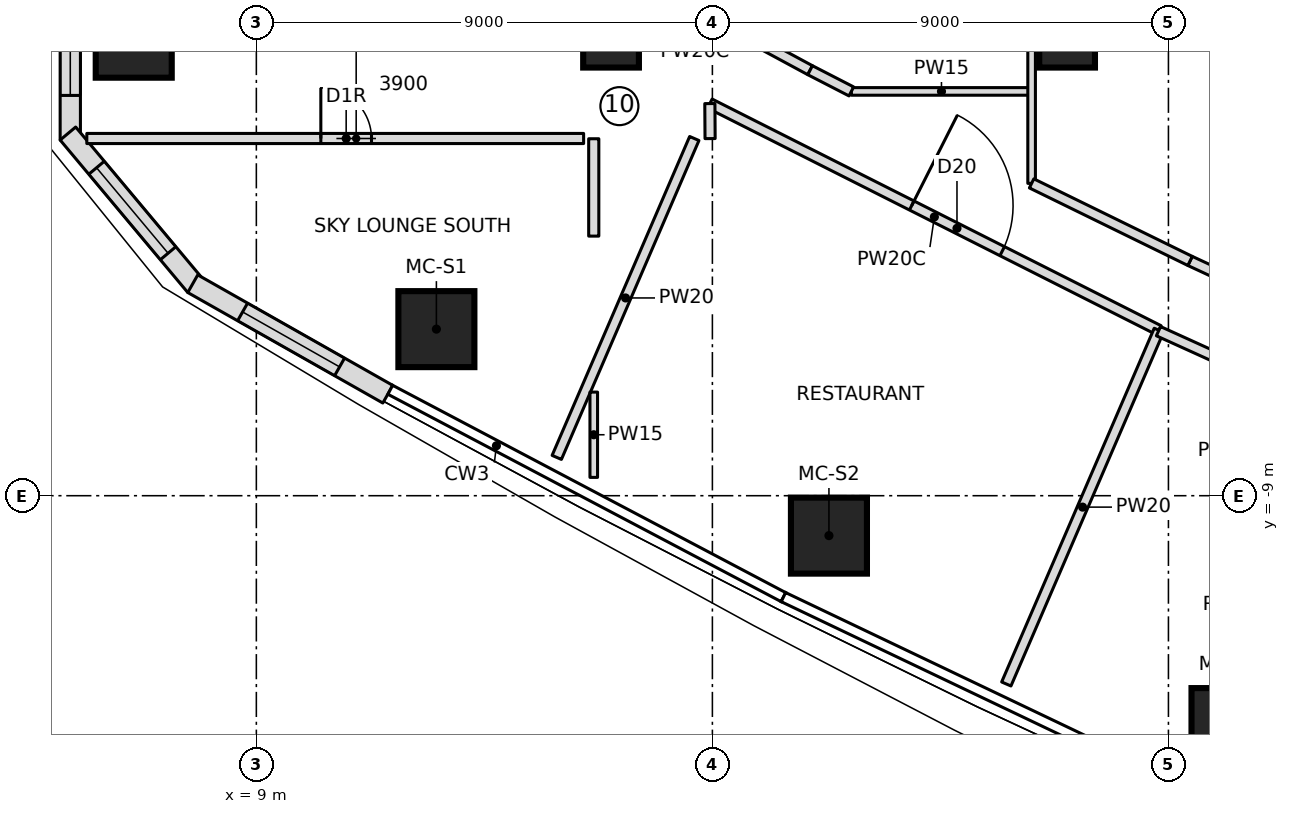
"""IFC4 building model, lengths in metres.
Left out: names, types, materials, properties, quantities, classifications, styles, units other than length and angle.
Written with IfcOpenShell. Run it as: python <this file> out.ifc"""

import sys

from ifc_helpers import new_model, si_unit, direction, frame, frame_2d, origin, origin_2d, place, context, subcontext, project, spatial, polyline, rectangle, outline, extrude, element, fill, save


model = new_model("IFC4")
c1 = context("Model", 3, precision=1e-05, world=origin(), true_north=direction((0.0, 1.0)))
c2 = subcontext(c1, "Body", "Model", "MODEL_VIEW")
j1 = project(units=[si_unit("LENGTHUNIT", "METRE"), si_unit("PLANEANGLEUNIT", "RADIAN")], contexts=[c1])
p1 = place(None, origin())
s1 = spatial("IfcSite", under=j1, at=p1, CompositionType="ELEMENT")
p2 = place(p1, origin())
s2 = spatial("IfcBuilding", under=s1, at=p2, CompositionType="ELEMENT")
p3 = place(p2, frame((0.0, 0.0, 125.6)))
s3 = spatial("IfcBuildingStorey", under=s2, at=p3, CompositionType="ELEMENT", Elevation=125.6)
for number, where, z_axis, x_axis in (
    (1, (6.58, 0.0, 0.0), (0.0, 0.0, 1.0), (1.0, 0.0, 0.0)),
    (2, (12.553, -5.713, 0.0), (0.0, 0.0, 1.0), (1.0, 0.0, 0.0)),
    (3, (20.3, -9.788, 0.0), (0.0, 0.0, 1.0), (1.0, 0.0, 0.0)),
    (4, (28.205, -13.547, 0.0), (0.0, 0.0, 1.0), (1.0, 0.0, 0.0)),
):
    element("IfcColumn", number, at=place(p3, frame(where, z_axis=z_axis, x_axis=x_axis)), inside=s3, PredefinedType="COLUMN", context=c2, shape_type="SweptSolid", body=[
        extrude(rectangle(XDim=1.5, YDim=1.5, at=origin_2d()), origin(), (0.0, 0.0, 1.0), 4.6),
    ])
for number, where, z_axis, x_axis in (
    (5, (16.0, 0.0, 0.0), (0.0, 0.0, 1.0), (1.0, 0.0, 0.0)),
    (6, (25.0, 0.0, 0.0), (0.0, 0.0, 1.0), (1.0, 0.0, 0.0)),
):
    element("IfcColumn", number, at=place(p3, frame(where, z_axis=z_axis, x_axis=x_axis)), inside=s3, PredefinedType="COLUMN", context=c2, shape_type="SweptSolid", body=[
        extrude(rectangle(XDim=1.1, YDim=1.1, at=origin_2d()), origin(), (0.0, 0.0, 1.0), 4.6),
    ])
p4 = place(p3, frame((5.328, 1.908, 0.0), z_axis=(0.0, 0.0, 1.0), x_axis=(0.0, -1.0, 0.0)))
e7 = element("IfcWall", 7, at=p4, inside=s3, PredefinedType="NOTDEFINED", context=c2, shape_type="SweptSolid", body=[
    extrude(outline(polyline([(-0.073, -0.2), (3.888, -0.2), (3.743, 0.2), (0.073, 0.2), (-0.073, -0.2)])), origin(), (0.0, 0.0, 1.0), 4.3),
])
p5 = place(p4, frame((0.808, 0.0, 0.6)))
e8 = element("IfcOpeningElement", 8, at=p5, cuts=e7, PredefinedType="OPENING", context=c2, shape_type="SweptSolid", body=[
    extrude(outline(polyline([(0.0, 1.35), (0.084, 1.771), (0.322, 2.128), (0.679, 2.366), (1.1, 2.45), (1.521, 2.366), (1.878, 2.128), (2.116, 1.771), (2.2, 1.35), (2.2, 1.1), (2.116, 0.679), (1.878, 0.322), (1.521, 0.084), (1.1, 0.0), (0.679, 0.084), (0.322, 0.322), (0.084, 0.679), (0.0, 1.1), (0.0, 1.35)])), frame((0.0, 0.21, 0.0), z_axis=(0.0, -1.0, 0.0), x_axis=(1.0, 0.0, 0.0)), (0.0, 0.0, 1.0), 0.42),
])
p6 = place(p3, frame((5.328, -1.908, 0.0), z_axis=(0.0, 0.0, 1.0), x_axis=(0.641787918235, -0.766882173484, 0.0)))
e9 = element("IfcWall", 9, at=p6, inside=s3, PredefinedType="NOTDEFINED", context=c2, shape_type="SweptSolid", body=[
    extrude(outline(polyline([(-0.073, -0.2), (3.852, -0.2), (3.779, 0.2), (0.073, 0.2), (-0.073, -0.2)])), origin(), (0.0, 0.0, 1.0), 4.3),
])
p7 = place(p6, frame((0.808, 0.0, 0.6)))
e10 = element("IfcOpeningElement", 10, at=p7, cuts=e9, PredefinedType="OPENING", context=c2, shape_type="SweptSolid", body=[
    extrude(outline(polyline([(0.0, 1.35), (0.084, 1.771), (0.322, 2.128), (0.679, 2.366), (1.1, 2.45), (1.521, 2.366), (1.878, 2.128), (2.116, 1.771), (2.2, 1.35), (2.2, 1.1), (2.116, 0.679), (1.878, 0.322), (1.521, 0.084), (1.1, 0.0), (0.679, 0.084), (0.322, 0.322), (0.084, 0.679), (0.0, 1.1), (0.0, 1.35)])), frame((0.0, 0.21, 0.0), z_axis=(0.0, -1.0, 0.0), x_axis=(1.0, 0.0, 0.0)), (0.0, 0.0, 1.0), 0.42),
])
p8 = place(p3, frame((7.777, -4.834, 0.0), z_axis=(0.0, 0.0, 1.0), x_axis=(0.870045255208, -0.492971859125, 0.0)))
e11 = element("IfcWall", 11, at=p8, inside=s3, PredefinedType="NOTDEFINED", context=c2, shape_type="SweptSolid", body=[
    extrude(outline(polyline([(-0.036, -0.2), (4.388, -0.2), (4.388, 0.2), (0.036, 0.2), (-0.036, -0.2)])), origin(), (0.0, 0.0, 1.0), 4.3),
])
p9 = place(p8, frame((1.094, 0.0, 0.6)))
e12 = element("IfcOpeningElement", 12, at=p9, cuts=e11, PredefinedType="OPENING", context=c2, shape_type="SweptSolid", body=[
    extrude(outline(polyline([(0.0, 1.35), (0.084, 1.771), (0.322, 2.128), (0.679, 2.366), (1.1, 2.45), (1.521, 2.366), (1.878, 2.128), (2.116, 1.771), (2.2, 1.35), (2.2, 1.1), (2.116, 0.679), (1.878, 0.322), (1.521, 0.084), (1.1, 0.0), (0.679, 0.084), (0.322, 0.322), (0.084, 0.679), (0.0, 1.1), (0.0, 1.35)])), frame((0.0, 0.21, 0.0), z_axis=(0.0, -1.0, 0.0), x_axis=(1.0, 0.0, 0.0)), (0.0, 0.0, 1.0), 0.42),
])
p10 = place(p3, frame((5.654, -1.95, 0.0), z_axis=(0.0, 0.0, 1.0), x_axis=(1.0, 0.0, 0.0)))
e13 = element("IfcWall", 13, at=p10, inside=s3, PredefinedType="PARTITIONING", context=c2, shape_type="SweptSolid", body=[
    extrude(rectangle(XDim=9.804, YDim=0.2, at=frame_2d((4.902, 0.0))), origin(), (0.0, 0.0, 1.0), 4.3),
])
p11 = place(p10, frame((4.618, 0.0, 0.0)))
e14 = element("IfcOpeningElement", 14, at=p11, cuts=e13, PredefinedType="OPENING", context=c2, shape_type="SweptSolid", body=[
    extrude(rectangle(XDim=1.0, YDim=2.1, at=frame_2d((0.5, 1.05))), frame((0.0, 0.11, 0.0), z_axis=(0.0, -1.0, 0.0), x_axis=(1.0, 0.0, 0.0)), (0.0, 0.0, 1.0), 0.22),
])
p12 = place(p3, frame((14.929, -8.244, 0.0), z_axis=(0.0, 0.0, 1.0), x_axis=(0.395994543879, 0.918252863441, 0.0)))
e15 = element("IfcWall", 15, at=p12, inside=s3, PredefinedType="PARTITIONING", context=c2, shape_type="SweptSolid", body=[
    extrude(rectangle(XDim=6.854, YDim=0.2, at=frame_2d((3.427, 0.0))), origin(), (0.0, 0.0, 1.0), 4.3),
])
p13 = place(p3, frame((17.95, -1.261, 0.0), z_axis=(0.0, 0.0, 1.0), x_axis=(0.892679126003, -0.450692775623, 0.0)))
e16 = element("IfcWall", 16, at=p13, inside=s3, PredefinedType="PARTITIONING", context=c2, shape_type="SweptSolid", body=[
    extrude(rectangle(XDim=9.927, YDim=0.2, at=frame_2d((4.963, 0.0))), origin(), (0.0, 0.0, 1.0), 4.3),
])
p14 = place(p13, frame((4.463, 0.0, 0.0)))
e17 = element("IfcOpeningElement", 17, at=p14, cuts=e16, PredefinedType="OPENING", context=c2, shape_type="SweptSolid", body=[
    extrude(rectangle(XDim=2.0, YDim=2.4, at=frame_2d((1.0, 1.2))), frame((0.0, 0.11, 0.0), z_axis=(0.0, -1.0, 0.0), x_axis=(1.0, 0.0, 0.0)), (0.0, 0.0, 1.0), 0.22),
])
p15 = place(p3, frame((23.801, -12.716, 0.0), z_axis=(0.0, 0.0, 1.0), x_axis=(0.395995556294, 0.918252426839, 0.0)))
e18 = element("IfcWall", 18, at=p15, inside=s3, PredefinedType="PARTITIONING", context=c2, shape_type="SweptSolid", body=[
    extrude(rectangle(XDim=7.603, YDim=0.2, at=frame_2d((3.802, 0.0))), origin(), (0.0, 0.0, 1.0), 4.3),
])
p16 = place(p3, frame((26.803, -5.753, 0.0), z_axis=(0.0, 0.0, 1.0), x_axis=(0.910552112877, -0.41339430298, 0.0)))
e19 = element("IfcWall", 19, at=p16, inside=s3, PredefinedType="PARTITIONING", context=c2, shape_type="SweptSolid", body=[
    extrude(rectangle(XDim=5.762, YDim=0.2, at=frame_2d((2.881, 0.0))), origin(), (0.0, 0.0, 1.0), 4.3),
])
p17 = place(p16, frame((2.381, 0.0, 0.0)))
e20 = element("IfcOpeningElement", 20, at=p17, cuts=e19, PredefinedType="OPENING", context=c2, shape_type="SweptSolid", body=[
    extrude(rectangle(XDim=2.0, YDim=2.4, at=frame_2d((1.0, 1.2))), frame((0.0, 0.11, 0.0), z_axis=(0.0, -1.0, 0.0), x_axis=(1.0, 0.0, 0.0)), (0.0, 0.0, 1.0), 0.22),
])
p18 = place(p3, frame((20.742, -1.021, 0.0), z_axis=(0.0, 0.0, 1.0), x_axis=(1.0, 0.0, 0.0)))
e21 = element("IfcWall", 21, at=p18, inside=s3, PredefinedType="PARTITIONING", context=c2, shape_type="SweptSolid", body=[
    extrude(rectangle(XDim=3.558, YDim=0.15, at=frame_2d((1.779, 0.0))), origin(), (0.0, 0.0, 1.0), 4.3),
])
p19 = place(p3, frame((19.928, -0.602, 0.0), z_axis=(0.0, 0.0, 1.0), x_axis=(-0.879832865766, 0.475283208538, 0.0)))
e22 = element("IfcWall", 22, at=p19, inside=s3, PredefinedType="PARTITIONING", context=c2, shape_type="SweptSolid", body=[
    extrude(rectangle(XDim=1.267, YDim=0.2, at=frame_2d((0.633, 0.0))), origin(), (0.0, 0.0, 1.0), 4.3),
])
p20 = place(p3, frame((20.742, -1.021, 0.0), z_axis=(0.0, 0.0, 1.0), x_axis=(-0.889027216477, 0.457854352784, 0.0)))
e23 = element("IfcWall", 23, at=p20, inside=s3, PredefinedType="PARTITIONING", context=c2, shape_type="SweptSolid", body=[
    extrude(rectangle(XDim=0.915, YDim=0.2, at=frame_2d((0.458, 0.0))), origin(), (0.0, 0.0, 1.0), 4.3),
])
p21 = place(p3, frame((24.3, -2.836, 0.0), z_axis=(0.0, 0.0, 1.0), x_axis=(0.0, 1.0, 0.0)))
e24 = element("IfcWall", 24, at=p21, inside=s3, PredefinedType="PARTITIONING", context=c2, shape_type="SweptSolid", body=[
    extrude(rectangle(XDim=5.672, YDim=0.15, at=frame_2d((2.836, 0.0))), origin(), (0.0, 0.0, 1.0), 4.3),
])
p22 = place(p3, frame((31.231, -6.135, 0.0), z_axis=(0.0, 0.0, 1.0), x_axis=(-0.906830275285, 0.421495968933, 0.0)))
e25 = element("IfcWall", 25, at=p22, inside=s3, PredefinedType="PARTITIONING", context=c2, shape_type="SweptSolid", body=[
    extrude(rectangle(XDim=4.195, YDim=0.2, at=frame_2d((2.098, 0.0))), origin(), (0.0, 0.0, 1.0), 4.3),
])
p23 = place(p3, frame((27.427, -4.367, 0.0), z_axis=(0.0, 0.0, 1.0), x_axis=(-0.898154271981, 0.43968045638, 0.0)))
e26 = element("IfcWall", 26, at=p23, inside=s3, PredefinedType="PARTITIONING", context=c2, shape_type="SweptSolid", body=[
    extrude(rectangle(XDim=3.481, YDim=0.2, at=frame_2d((1.741, 0.0))), origin(), (0.0, 0.0, 1.0), 4.3),
])
p24 = place(p3, frame((15.659, -6.955, 0.0), z_axis=(0.0, 0.0, 1.0), x_axis=(0.0, -1.0, 0.0)))
e27 = element("IfcWall", 27, at=p24, inside=s3, PredefinedType="PARTITIONING", context=c2, shape_type="SweptSolid", body=[
    extrude(rectangle(XDim=1.684, YDim=0.15, at=frame_2d((0.842, 0.0))), origin(), (0.0, 0.0, 1.0), 4.3),
])
p25 = place(p3, frame((15.659, -1.955, 0.0), z_axis=(0.0, 0.0, 1.0), x_axis=(0.0, -1.0, 0.0)))
e28 = element("IfcWall", 28, at=p25, inside=s3, PredefinedType="PARTITIONING", context=c2, shape_type="SweptSolid", body=[
    extrude(rectangle(XDim=1.922, YDim=0.2, at=frame_2d((0.961, 0.0))), origin(), (0.0, 0.0, 1.0), 4.3),
])
p26 = place(p3, frame((17.955, -1.952, 0.0), z_axis=(0.0, 0.0, 1.0), x_axis=(-0.00671125825, 0.999977479253, 0.0)))
e29 = element("IfcWall", 29, at=p26, inside=s3, PredefinedType="PARTITIONING", context=c2, shape_type="SweptSolid", body=[
    extrude(rectangle(XDim=0.691, YDim=0.2, at=frame_2d((0.346, 0.0))), origin(), (0.0, 0.0, 1.0), 4.3),
])
p27 = place(p5, origin())
e30 = element("IfcWindow", 30, at=p27, inside=s3, PartitioningType="SINGLE_PANEL", PredefinedType="WINDOW", context=c2, shape_type="SweptSolid", body=[
    extrude(outline(polyline([(0.0, 1.35), (0.084, 1.771), (0.322, 2.128), (0.679, 2.366), (1.1, 2.45), (1.521, 2.366), (1.878, 2.128), (2.116, 1.771), (2.2, 1.35), (2.2, 1.1), (2.116, 0.679), (1.878, 0.322), (1.521, 0.084), (1.1, 0.0), (0.679, 0.084), (0.322, 0.322), (0.084, 0.679), (0.0, 1.1), (0.0, 1.35)])), frame((0.0, 0.17, 0.0), z_axis=(0.0, -1.0, 0.0), x_axis=(1.0, 0.0, 0.0)), (0.0, 0.0, 1.0), 0.06),
])
fill(e8, e30)
p28 = place(p7, origin())
e31 = element("IfcWindow", 31, at=p28, inside=s3, PartitioningType="SINGLE_PANEL", PredefinedType="WINDOW", context=c2, shape_type="SweptSolid", body=[
    extrude(outline(polyline([(0.0, 1.35), (0.084, 1.771), (0.322, 2.128), (0.679, 2.366), (1.1, 2.45), (1.521, 2.366), (1.878, 2.128), (2.116, 1.771), (2.2, 1.35), (2.2, 1.1), (2.116, 0.679), (1.878, 0.322), (1.521, 0.084), (1.1, 0.0), (0.679, 0.084), (0.322, 0.322), (0.084, 0.679), (0.0, 1.1), (0.0, 1.35)])), frame((0.0, 0.17, 0.0), z_axis=(0.0, -1.0, 0.0), x_axis=(1.0, 0.0, 0.0)), (0.0, 0.0, 1.0), 0.06),
])
fill(e10, e31)
p29 = place(p9, origin())
e32 = element("IfcWindow", 32, at=p29, inside=s3, PartitioningType="SINGLE_PANEL", PredefinedType="WINDOW", context=c2, shape_type="SweptSolid", body=[
    extrude(outline(polyline([(0.0, 1.35), (0.084, 1.771), (0.322, 2.128), (0.679, 2.366), (1.1, 2.45), (1.521, 2.366), (1.878, 2.128), (2.116, 1.771), (2.2, 1.35), (2.2, 1.1), (2.116, 0.679), (1.878, 0.322), (1.521, 0.084), (1.1, 0.0), (0.679, 0.084), (0.322, 0.322), (0.084, 0.679), (0.0, 1.1), (0.0, 1.35)])), frame((0.0, 0.17, 0.0), z_axis=(0.0, -1.0, 0.0), x_axis=(1.0, 0.0, 0.0)), (0.0, 0.0, 1.0), 0.06),
])
fill(e12, e32)
p30 = place(p11, origin())
e33 = element("IfcDoor", 33, at=p30, inside=s3, OperationType="SINGLE_SWING_RIGHT", PredefinedType="DOOR", context=c2, shape_type="SweptSolid", body=[
    extrude(rectangle(XDim=1.0, YDim=2.1, at=frame_2d((0.5, 1.05))), frame((0.0, 0.025, 0.0), z_axis=(0.0, -1.0, 0.0), x_axis=(1.0, 0.0, 0.0)), (0.0, 0.0, 1.0), 0.05),
])
fill(e14, e33)
p31 = place(p14, origin())
e34 = element("IfcDoor", 34, at=p31, inside=s3, OperationType="DOUBLE_DOOR_SINGLE_SWING", PredefinedType="DOOR", context=c2, shape_type="SweptSolid", body=[
    extrude(rectangle(XDim=2.0, YDim=2.4, at=frame_2d((1.0, 1.2))), frame((0.0, 0.025, 0.0), z_axis=(0.0, -1.0, 0.0), x_axis=(1.0, 0.0, 0.0)), (0.0, 0.0, 1.0), 0.05),
])
fill(e17, e34)
save(model, sys.argv[1])
